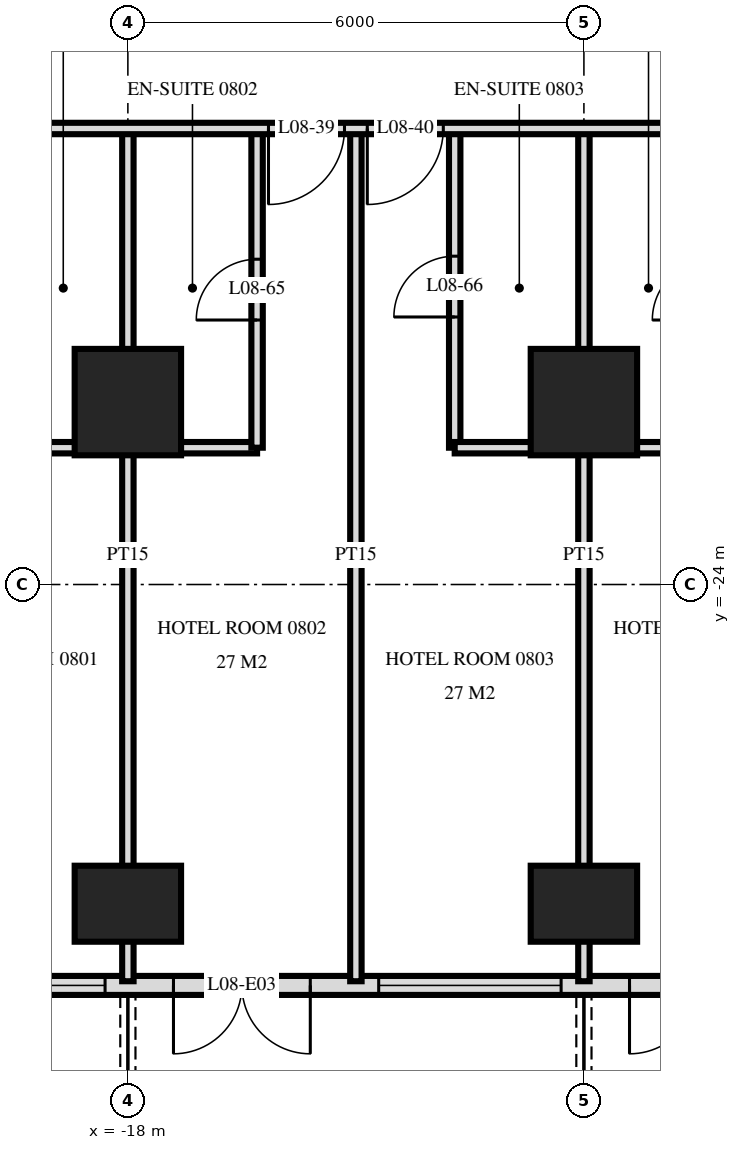
"""IFC4 building model, lengths in metres.
Left out: names, types, materials, properties, quantities, classifications, styles, units other than length and angle.
Written with IfcOpenShell. Run it as: python <this file> out.ifc"""

import sys

from ifc_helpers import new_model, si_unit, direction, frame, frame_2d, origin, origin_2d, place, context, subcontext, project, spatial, rectangle, extrude, element, fill, save


model = new_model("IFC4")
c1 = context("Model", 3, precision=1e-05, world=origin(), true_north=direction((0.0, 1.0)))
c2 = subcontext(c1, "Body", "Model", "MODEL_VIEW")
j1 = project(units=[si_unit("LENGTHUNIT", "METRE"), si_unit("PLANEANGLEUNIT", "RADIAN")], contexts=[c1])
p1 = place(None, origin())
s1 = spatial("IfcSite", under=j1, at=p1, CompositionType="ELEMENT")
p2 = place(p1, origin())
s2 = spatial("IfcBuilding", under=s1, at=p2, CompositionType="ELEMENT")
p3 = place(p2, frame((0.0, 0.0, 38.4)))
s3 = spatial("IfcBuildingStorey", under=s2, at=p3, CompositionType="ELEMENT", Elevation=38.4)
p4 = place(p3, frame((-18.0, -28.2, 0.0), z_axis=(0.0, 0.0, 1.0), x_axis=(1.0, 0.0, 0.0)))
e1 = element("IfcColumn", 1, at=p4, inside=s3, PredefinedType="COLUMN", context=c2, shape_type="SweptSolid", body=[
    extrude(rectangle(XDim=1.4, YDim=1.0, at=origin_2d()), origin(), (0.0, 0.0, 1.0), 3.6),
])
p5 = place(p3, frame((-18.0, -21.6, 0.0), z_axis=(0.0, 0.0, 1.0), x_axis=(1.0, 0.0, 0.0)))
e2 = element("IfcColumn", 2, at=p5, inside=s3, PredefinedType="COLUMN", context=c2, shape_type="SweptSolid", body=[
    extrude(rectangle(XDim=1.4, YDim=1.4, at=origin_2d()), origin(), (0.0, 0.0, 1.0), 3.6),
])
p6 = place(p3, frame((-12.0, -28.2, 0.0), z_axis=(0.0, 0.0, 1.0), x_axis=(1.0, 0.0, 0.0)))
e3 = element("IfcColumn", 3, at=p6, inside=s3, PredefinedType="COLUMN", context=c2, shape_type="SweptSolid", body=[
    extrude(rectangle(XDim=1.4, YDim=1.0, at=origin_2d()), origin(), (0.0, 0.0, 1.0), 3.6),
])
p7 = place(p3, frame((-12.0, -21.6, 0.0), z_axis=(0.0, 0.0, 1.0), x_axis=(1.0, 0.0, 0.0)))
e4 = element("IfcColumn", 4, at=p7, inside=s3, PredefinedType="COLUMN", context=c2, shape_type="SweptSolid", body=[
    extrude(rectangle(XDim=1.4, YDim=1.4, at=origin_2d()), origin(), (0.0, 0.0, 1.0), 3.6),
])
p8 = place(p3, frame((-28.775, -29.275, 0.0), z_axis=(0.0, 0.0, 1.0), x_axis=(1.0, 0.0, 0.0)))
e5 = element("IfcWall", 5, at=p8, inside=s3, PredefinedType="SOLIDWALL", context=c2, shape_type="SweptSolid", body=[
    extrude(rectangle(XDim=57.551, YDim=0.25, at=frame_2d((28.775, 0.0))), origin(), (0.0, 0.0, 1.0), 3.32),
])
p9 = place(p8, frame((0.575, 0.0, 0.0)))
e6 = element("IfcOpeningElement", 6, at=p9, cuts=e5, PredefinedType="OPENING", context=c2, shape_type="SweptSolid", body=[
    extrude(rectangle(XDim=1.8, YDim=2.4, at=frame_2d((0.9, 1.2))), frame((0.0, 0.135, 0.0), z_axis=(0.0, -1.0, 0.0), x_axis=(1.0, 0.0, 0.0)), (0.0, 0.0, 1.0), 0.27),
])
p10 = place(p8, frame((5.375, 0.0, 0.0)))
e7 = element("IfcOpeningElement", 7, at=p10, cuts=e5, PredefinedType="OPENING", context=c2, shape_type="SweptSolid", body=[
    extrude(rectangle(XDim=1.8, YDim=2.4, at=frame_2d((0.9, 1.2))), frame((0.0, 0.135, 0.0), z_axis=(0.0, -1.0, 0.0), x_axis=(1.0, 0.0, 0.0)), (0.0, 0.0, 1.0), 0.27),
])
p11 = place(p8, frame((8.075, 0.0, 0.3)))
e8 = element("IfcOpeningElement", 8, at=p11, cuts=e5, PredefinedType="OPENING", context=c2, shape_type="SweptSolid", body=[
    extrude(rectangle(XDim=2.4, YDim=2.1, at=frame_2d((1.2, 1.05))), frame((0.0, 0.135, 0.0), z_axis=(0.0, -1.0, 0.0), x_axis=(1.0, 0.0, 0.0)), (0.0, 0.0, 1.0), 0.27),
])
p12 = place(p8, frame((11.375, 0.0, 0.0)))
e9 = element("IfcOpeningElement", 9, at=p12, cuts=e5, PredefinedType="OPENING", context=c2, shape_type="SweptSolid", body=[
    extrude(rectangle(XDim=1.8, YDim=2.4, at=frame_2d((0.9, 1.2))), frame((0.0, 0.135, 0.0), z_axis=(0.0, -1.0, 0.0), x_axis=(1.0, 0.0, 0.0)), (0.0, 0.0, 1.0), 0.27),
])
p13 = place(p8, frame((14.075, 0.0, 0.3)))
e10 = element("IfcOpeningElement", 10, at=p13, cuts=e5, PredefinedType="OPENING", context=c2, shape_type="SweptSolid", body=[
    extrude(rectangle(XDim=2.4, YDim=2.1, at=frame_2d((1.2, 1.05))), frame((0.0, 0.135, 0.0), z_axis=(0.0, -1.0, 0.0), x_axis=(1.0, 0.0, 0.0)), (0.0, 0.0, 1.0), 0.27),
])
p14 = place(p8, frame((17.375, 0.0, 0.0)))
e11 = element("IfcOpeningElement", 11, at=p14, cuts=e5, PredefinedType="OPENING", context=c2, shape_type="SweptSolid", body=[
    extrude(rectangle(XDim=1.8, YDim=2.4, at=frame_2d((0.9, 1.2))), frame((0.0, 0.135, 0.0), z_axis=(0.0, -1.0, 0.0), x_axis=(1.0, 0.0, 0.0)), (0.0, 0.0, 1.0), 0.27),
])
p15 = place(p8, frame((20.075, 0.0, 0.3)))
e12 = element("IfcOpeningElement", 12, at=p15, cuts=e5, PredefinedType="OPENING", context=c2, shape_type="SweptSolid", body=[
    extrude(rectangle(XDim=2.4, YDim=2.1, at=frame_2d((1.2, 1.05))), frame((0.0, 0.135, 0.0), z_axis=(0.0, -1.0, 0.0), x_axis=(1.0, 0.0, 0.0)), (0.0, 0.0, 1.0), 0.27),
])
p16 = place(p8, frame((23.075, 0.0, 0.3)))
e13 = element("IfcOpeningElement", 13, at=p16, cuts=e5, PredefinedType="OPENING", context=c2, shape_type="SweptSolid", body=[
    extrude(rectangle(XDim=2.4, YDim=2.1, at=frame_2d((1.2, 1.05))), frame((0.0, 0.135, 0.0), z_axis=(0.0, -1.0, 0.0), x_axis=(1.0, 0.0, 0.0)), (0.0, 0.0, 1.0), 0.27),
])
p17 = place(p8, frame((26.375, 0.0, 0.0)))
e14 = element("IfcOpeningElement", 14, at=p17, cuts=e5, PredefinedType="OPENING", context=c2, shape_type="SweptSolid", body=[
    extrude(rectangle(XDim=1.8, YDim=2.4, at=frame_2d((0.9, 1.2))), frame((0.0, 0.135, 0.0), z_axis=(0.0, -1.0, 0.0), x_axis=(1.0, 0.0, 0.0)), (0.0, 0.0, 1.0), 0.27),
])
p18 = place(p8, frame((29.375, 0.0, 0.0)))
e15 = element("IfcOpeningElement", 15, at=p18, cuts=e5, PredefinedType="OPENING", context=c2, shape_type="SweptSolid", body=[
    extrude(rectangle(XDim=1.8, YDim=2.4, at=frame_2d((0.9, 1.2))), frame((0.0, 0.135, 0.0), z_axis=(0.0, -1.0, 0.0), x_axis=(1.0, 0.0, 0.0)), (0.0, 0.0, 1.0), 0.27),
])
p19 = place(p8, frame((32.075, 0.0, 0.3)))
e16 = element("IfcOpeningElement", 16, at=p19, cuts=e5, PredefinedType="OPENING", context=c2, shape_type="SweptSolid", body=[
    extrude(rectangle(XDim=2.4, YDim=2.1, at=frame_2d((1.2, 1.05))), frame((0.0, 0.135, 0.0), z_axis=(0.0, -1.0, 0.0), x_axis=(1.0, 0.0, 0.0)), (0.0, 0.0, 1.0), 0.27),
])
p20 = place(p8, frame((35.375, 0.0, 0.0)))
e17 = element("IfcOpeningElement", 17, at=p20, cuts=e5, PredefinedType="OPENING", context=c2, shape_type="SweptSolid", body=[
    extrude(rectangle(XDim=1.8, YDim=2.4, at=frame_2d((0.9, 1.2))), frame((0.0, 0.135, 0.0), z_axis=(0.0, -1.0, 0.0), x_axis=(1.0, 0.0, 0.0)), (0.0, 0.0, 1.0), 0.27),
])
p21 = place(p8, frame((38.075, 0.0, 0.3)))
e18 = element("IfcOpeningElement", 18, at=p21, cuts=e5, PredefinedType="OPENING", context=c2, shape_type="SweptSolid", body=[
    extrude(rectangle(XDim=2.4, YDim=2.1, at=frame_2d((1.2, 1.05))), frame((0.0, 0.135, 0.0), z_axis=(0.0, -1.0, 0.0), x_axis=(1.0, 0.0, 0.0)), (0.0, 0.0, 1.0), 0.27),
])
p22 = place(p8, frame((41.375, 0.0, 0.0)))
e19 = element("IfcOpeningElement", 19, at=p22, cuts=e5, PredefinedType="OPENING", context=c2, shape_type="SweptSolid", body=[
    extrude(rectangle(XDim=1.8, YDim=2.4, at=frame_2d((0.9, 1.2))), frame((0.0, 0.135, 0.0), z_axis=(0.0, -1.0, 0.0), x_axis=(1.0, 0.0, 0.0)), (0.0, 0.0, 1.0), 0.27),
])
p23 = place(p8, frame((44.075, 0.0, 0.3)))
e20 = element("IfcOpeningElement", 20, at=p23, cuts=e5, PredefinedType="OPENING", context=c2, shape_type="SweptSolid", body=[
    extrude(rectangle(XDim=2.4, YDim=2.1, at=frame_2d((1.2, 1.05))), frame((0.0, 0.135, 0.0), z_axis=(0.0, -1.0, 0.0), x_axis=(1.0, 0.0, 0.0)), (0.0, 0.0, 1.0), 0.27),
])
p24 = place(p8, frame((47.375, 0.0, 0.0)))
e21 = element("IfcOpeningElement", 21, at=p24, cuts=e5, PredefinedType="OPENING", context=c2, shape_type="SweptSolid", body=[
    extrude(rectangle(XDim=1.8, YDim=2.4, at=frame_2d((0.9, 1.2))), frame((0.0, 0.135, 0.0), z_axis=(0.0, -1.0, 0.0), x_axis=(1.0, 0.0, 0.0)), (0.0, 0.0, 1.0), 0.27),
])
p25 = place(p8, frame((50.075, 0.0, 0.3)))
e22 = element("IfcOpeningElement", 22, at=p25, cuts=e5, PredefinedType="OPENING", context=c2, shape_type="SweptSolid", body=[
    extrude(rectangle(XDim=2.4, YDim=2.1, at=frame_2d((1.2, 1.05))), frame((0.0, 0.135, 0.0), z_axis=(0.0, -1.0, 0.0), x_axis=(1.0, 0.0, 0.0)), (0.0, 0.0, 1.0), 0.27),
])
p26 = place(p8, frame((53.375, 0.0, 0.0)))
e23 = element("IfcOpeningElement", 23, at=p26, cuts=e5, PredefinedType="OPENING", context=c2, shape_type="SweptSolid", body=[
    extrude(rectangle(XDim=1.8, YDim=2.4, at=frame_2d((0.9, 1.2))), frame((0.0, 0.135, 0.0), z_axis=(0.0, -1.0, 0.0), x_axis=(1.0, 0.0, 0.0)), (0.0, 0.0, 1.0), 0.27),
])
p27 = place(p3, frame((-12.0, -29.22, 0.0), z_axis=(0.0, 0.0, 1.0), x_axis=(0.0, 1.0, 0.0)))
e24 = element("IfcWall", 24, at=p27, inside=s3, PredefinedType="PARTITIONING", context=c2, shape_type="SweptSolid", body=[
    extrude(rectangle(XDim=11.22, YDim=0.15, at=frame_2d((5.61, 0.0))), origin(), (0.0, 0.0, 1.0), 3.32),
])
p28 = place(p3, frame((-13.7, -22.2, 0.0), z_axis=(0.0, 0.0, 1.0), x_axis=(0.0, 1.0, 0.0)))
e25 = element("IfcWall", 25, at=p28, inside=s3, PredefinedType="PARTITIONING", context=c2, shape_type="SweptSolid", body=[
    extrude(rectangle(XDim=4.2, YDim=0.15, at=frame_2d((2.1, 0.0))), origin(), (0.0, 0.0, 1.0), 3.32),
])
p29 = place(p28, frame((1.72, 0.0, 0.0)))
e26 = element("IfcOpeningElement", 26, at=p29, cuts=e25, PredefinedType="OPENING", context=c2, shape_type="SweptSolid", body=[
    extrude(rectangle(XDim=0.8, YDim=2.1, at=frame_2d((0.4, 1.05))), frame((0.0, 0.085, 0.0), z_axis=(0.0, -1.0, 0.0), x_axis=(1.0, 0.0, 0.0)), (0.0, 0.0, 1.0), 0.17),
])
p30 = place(p3, frame((-15.0, -29.22, 0.0), z_axis=(0.0, 0.0, 1.0), x_axis=(0.0, 1.0, 0.0)))
e27 = element("IfcWall", 27, at=p30, inside=s3, PredefinedType="PARTITIONING", context=c2, shape_type="SweptSolid", body=[
    extrude(rectangle(XDim=11.22, YDim=0.15, at=frame_2d((5.61, 0.0))), origin(), (0.0, 0.0, 1.0), 3.32),
])
p31 = place(p3, frame((-16.3, -22.2, 0.0), z_axis=(0.0, 0.0, 1.0), x_axis=(0.0, 1.0, 0.0)))
e28 = element("IfcWall", 28, at=p31, inside=s3, PredefinedType="PARTITIONING", context=c2, shape_type="SweptSolid", body=[
    extrude(rectangle(XDim=4.2, YDim=0.15, at=frame_2d((2.1, 0.0))), origin(), (0.0, 0.0, 1.0), 3.32),
])
p32 = place(p31, frame((1.68, 0.0, 0.0)))
e29 = element("IfcOpeningElement", 29, at=p32, cuts=e28, PredefinedType="OPENING", context=c2, shape_type="SweptSolid", body=[
    extrude(rectangle(XDim=0.8, YDim=2.1, at=frame_2d((0.4, 1.05))), frame((0.0, 0.085, 0.0), z_axis=(0.0, -1.0, 0.0), x_axis=(1.0, 0.0, 0.0)), (0.0, 0.0, 1.0), 0.17),
])
p33 = place(p3, frame((-18.0, -29.22, 0.0), z_axis=(0.0, 0.0, 1.0), x_axis=(0.0, 1.0, 0.0)))
e30 = element("IfcWall", 30, at=p33, inside=s3, PredefinedType="PARTITIONING", context=c2, shape_type="SweptSolid", body=[
    extrude(rectangle(XDim=11.22, YDim=0.15, at=frame_2d((5.61, 0.0))), origin(), (0.0, 0.0, 1.0), 3.32),
])
for number, where, z_axis, x_axis in (
    (31, (-19.7, -22.2, 0.0), (0.0, 0.0, 1.0), (1.0, 0.0, 0.0)),
    (32, (-13.7, -22.2, 0.0), (0.0, 0.0, 1.0), (1.0, 0.0, 0.0)),
):
    element("IfcWall", number, at=place(p3, frame(where, z_axis=z_axis, x_axis=x_axis)), inside=s3, PredefinedType="PARTITIONING", context=c2, shape_type="SweptSolid", body=[
        extrude(rectangle(XDim=3.4, YDim=0.15, at=frame_2d((1.7, 0.0))), origin(), (0.0, 0.0, 1.0), 3.32),
    ])
p34 = place(p3, frame((-33.12, -18.0, 0.0), z_axis=(0.0, 0.0, 1.0), x_axis=(1.0, 0.0, 0.0)))
e33 = element("IfcWall", 33, at=p34, inside=s3, PredefinedType="PARTITIONING", context=c2, shape_type="SweptSolid", body=[
    extrude(rectangle(XDim=66.24, YDim=0.15, at=frame_2d((33.12, 0.0))), origin(), (0.0, 0.0, 1.0), 3.32),
])
p35 = place(p34, frame((12.27, 0.0, 0.0)))
e34 = element("IfcOpeningElement", 34, at=p35, cuts=e33, PredefinedType="OPENING", context=c2, shape_type="SweptSolid", body=[
    extrude(rectangle(XDim=1.0, YDim=2.1, at=frame_2d((0.5, 1.05))), frame((0.0, 0.085, 0.0), z_axis=(0.0, -1.0, 0.0), x_axis=(1.0, 0.0, 0.0)), (0.0, 0.0, 1.0), 0.17),
])
p36 = place(p34, frame((16.97, 0.0, 0.0)))
e35 = element("IfcOpeningElement", 35, at=p36, cuts=e33, PredefinedType="OPENING", context=c2, shape_type="SweptSolid", body=[
    extrude(rectangle(XDim=1.0, YDim=2.1, at=frame_2d((0.5, 1.05))), frame((0.0, 0.085, 0.0), z_axis=(0.0, -1.0, 0.0), x_axis=(1.0, 0.0, 0.0)), (0.0, 0.0, 1.0), 0.17),
])
p37 = place(p34, frame((18.27, 0.0, 0.0)))
e36 = element("IfcOpeningElement", 36, at=p37, cuts=e33, PredefinedType="OPENING", context=c2, shape_type="SweptSolid", body=[
    extrude(rectangle(XDim=1.0, YDim=2.1, at=frame_2d((0.5, 1.05))), frame((0.0, 0.085, 0.0), z_axis=(0.0, -1.0, 0.0), x_axis=(1.0, 0.0, 0.0)), (0.0, 0.0, 1.0), 0.17),
])
p38 = place(p34, frame((22.97, 0.0, 0.0)))
e37 = element("IfcOpeningElement", 37, at=p38, cuts=e33, PredefinedType="OPENING", context=c2, shape_type="SweptSolid", body=[
    extrude(rectangle(XDim=1.0, YDim=2.1, at=frame_2d((0.5, 1.05))), frame((0.0, 0.085, 0.0), z_axis=(0.0, -1.0, 0.0), x_axis=(1.0, 0.0, 0.0)), (0.0, 0.0, 1.0), 0.17),
])
p39 = place(p34, frame((24.27, 0.0, 0.0)))
e38 = element("IfcOpeningElement", 38, at=p39, cuts=e33, PredefinedType="OPENING", context=c2, shape_type="SweptSolid", body=[
    extrude(rectangle(XDim=1.0, YDim=2.1, at=frame_2d((0.5, 1.05))), frame((0.0, 0.085, 0.0), z_axis=(0.0, -1.0, 0.0), x_axis=(1.0, 0.0, 0.0)), (0.0, 0.0, 1.0), 0.17),
])
p40 = place(p34, frame((28.97, 0.0, 0.0)))
e39 = element("IfcOpeningElement", 39, at=p40, cuts=e33, PredefinedType="OPENING", context=c2, shape_type="SweptSolid", body=[
    extrude(rectangle(XDim=1.0, YDim=2.1, at=frame_2d((0.5, 1.05))), frame((0.0, 0.085, 0.0), z_axis=(0.0, -1.0, 0.0), x_axis=(1.0, 0.0, 0.0)), (0.0, 0.0, 1.0), 0.17),
])
p41 = place(p34, frame((30.27, 0.0, 0.0)))
e40 = element("IfcOpeningElement", 40, at=p41, cuts=e33, PredefinedType="OPENING", context=c2, shape_type="SweptSolid", body=[
    extrude(rectangle(XDim=1.0, YDim=2.1, at=frame_2d((0.5, 1.05))), frame((0.0, 0.085, 0.0), z_axis=(0.0, -1.0, 0.0), x_axis=(1.0, 0.0, 0.0)), (0.0, 0.0, 1.0), 0.17),
])
p42 = place(p34, frame((34.97, 0.0, 0.0)))
e41 = element("IfcOpeningElement", 41, at=p42, cuts=e33, PredefinedType="OPENING", context=c2, shape_type="SweptSolid", body=[
    extrude(rectangle(XDim=1.0, YDim=2.1, at=frame_2d((0.5, 1.05))), frame((0.0, 0.085, 0.0), z_axis=(0.0, -1.0, 0.0), x_axis=(1.0, 0.0, 0.0)), (0.0, 0.0, 1.0), 0.17),
])
p43 = place(p34, frame((37.27, 0.0, 0.0)))
e42 = element("IfcOpeningElement", 42, at=p43, cuts=e33, PredefinedType="OPENING", context=c2, shape_type="SweptSolid", body=[
    extrude(rectangle(XDim=1.0, YDim=2.1, at=frame_2d((0.5, 1.05))), frame((0.0, 0.085, 0.0), z_axis=(0.0, -1.0, 0.0), x_axis=(1.0, 0.0, 0.0)), (0.0, 0.0, 1.0), 0.17),
])
p44 = place(p34, frame((43.97, 0.0, 0.0)))
e43 = element("IfcOpeningElement", 43, at=p44, cuts=e33, PredefinedType="OPENING", context=c2, shape_type="SweptSolid", body=[
    extrude(rectangle(XDim=1.0, YDim=2.1, at=frame_2d((0.5, 1.05))), frame((0.0, 0.085, 0.0), z_axis=(0.0, -1.0, 0.0), x_axis=(1.0, 0.0, 0.0)), (0.0, 0.0, 1.0), 0.17),
])
p45 = place(p34, frame((45.27, 0.0, 0.0)))
e44 = element("IfcOpeningElement", 44, at=p45, cuts=e33, PredefinedType="OPENING", context=c2, shape_type="SweptSolid", body=[
    extrude(rectangle(XDim=1.0, YDim=2.1, at=frame_2d((0.5, 1.05))), frame((0.0, 0.085, 0.0), z_axis=(0.0, -1.0, 0.0), x_axis=(1.0, 0.0, 0.0)), (0.0, 0.0, 1.0), 0.17),
])
p46 = place(p34, frame((51.22, 0.0, 0.0)))
e45 = element("IfcOpeningElement", 45, at=p46, cuts=e33, PredefinedType="OPENING", context=c2, shape_type="SweptSolid", body=[
    extrude(rectangle(XDim=1.0, YDim=2.1, at=frame_2d((0.5, 1.05))), frame((0.0, 0.085, 0.0), z_axis=(0.0, -1.0, 0.0), x_axis=(1.0, 0.0, 0.0)), (0.0, 0.0, 1.0), 0.17),
])
p47 = place(p34, frame((54.27, 0.0, 0.0)))
e46 = element("IfcOpeningElement", 46, at=p47, cuts=e33, PredefinedType="OPENING", context=c2, shape_type="SweptSolid", body=[
    extrude(rectangle(XDim=1.0, YDim=2.1, at=frame_2d((0.5, 1.05))), frame((0.0, 0.085, 0.0), z_axis=(0.0, -1.0, 0.0), x_axis=(1.0, 0.0, 0.0)), (0.0, 0.0, 1.0), 0.17),
])
p48 = place(p34, frame((6.07, 0.0, 0.0)))
e47 = element("IfcOpeningElement", 47, at=p48, cuts=e33, PredefinedType="OPENING", context=c2, shape_type="SweptSolid", body=[
    extrude(rectangle(XDim=1.0, YDim=2.1, at=frame_2d((0.5, 1.05))), frame((0.0, 0.085, 0.0), z_axis=(0.0, -1.0, 0.0), x_axis=(1.0, 0.0, 0.0)), (0.0, 0.0, 1.0), 0.17),
])
p49 = place(p34, frame((63.37, 0.0, 0.0)))
e48 = element("IfcOpeningElement", 48, at=p49, cuts=e33, PredefinedType="OPENING", context=c2, shape_type="SweptSolid", body=[
    extrude(rectangle(XDim=1.0, YDim=2.1, at=frame_2d((0.5, 1.05))), frame((0.0, 0.085, 0.0), z_axis=(0.0, -1.0, 0.0), x_axis=(1.0, 0.0, 0.0)), (0.0, 0.0, 1.0), 0.17),
])
p50 = place(p11, origin())
e49 = element("IfcWindow", 49, at=p50, inside=s3, PartitioningType="SINGLE_PANEL", PredefinedType="WINDOW", context=c2, shape_type="SweptSolid", body=[
    extrude(rectangle(XDim=2.4, YDim=2.1, at=frame_2d((1.2, 1.05))), frame((0.0, 0.03, 0.0), z_axis=(0.0, -1.0, 0.0), x_axis=(1.0, 0.0, 0.0)), (0.0, 0.0, 1.0), 0.06),
])
fill(e8, e49)
p51 = place(p12, frame((0.9, 0.0, 0.0), z_axis=(0.0, 0.0, 1.0), x_axis=(-1.0, 0.0, 0.0)))
e50 = element("IfcDoor", 50, at=p51, inside=s3, OperationType="DOUBLE_DOOR_SINGLE_SWING", PredefinedType="DOOR", context=c2, shape_type="SweptSolid", body=[
    extrude(rectangle(XDim=1.8, YDim=2.4, at=frame_2d((0.0, 1.2))), frame((0.0, -0.025, 0.0), z_axis=(0.0, 1.0, 0.0), x_axis=(-1.0, 0.0, 0.0)), (0.0, 0.0, 1.0), 0.05),
])
fill(e9, e50)
p52 = place(p13, origin())
e51 = element("IfcWindow", 51, at=p52, inside=s3, PartitioningType="SINGLE_PANEL", PredefinedType="WINDOW", context=c2, shape_type="SweptSolid", body=[
    extrude(rectangle(XDim=2.4, YDim=2.1, at=frame_2d((1.2, 1.05))), frame((0.0, 0.03, 0.0), z_axis=(0.0, -1.0, 0.0), x_axis=(1.0, 0.0, 0.0)), (0.0, 0.0, 1.0), 0.06),
])
fill(e10, e51)
p53 = place(p14, frame((0.9, 0.0, 0.0), z_axis=(0.0, 0.0, 1.0), x_axis=(-1.0, 0.0, 0.0)))
e52 = element("IfcDoor", 52, at=p53, inside=s3, OperationType="DOUBLE_DOOR_SINGLE_SWING", PredefinedType="DOOR", context=c2, shape_type="SweptSolid", body=[
    extrude(rectangle(XDim=1.8, YDim=2.4, at=frame_2d((0.0, 1.2))), frame((0.0, -0.025, 0.0), z_axis=(0.0, 1.0, 0.0), x_axis=(-1.0, 0.0, 0.0)), (0.0, 0.0, 1.0), 0.05),
])
fill(e11, e52)
p54 = place(p36, frame((0.5, 0.0, 0.0), z_axis=(0.0, 0.0, 1.0), x_axis=(-1.0, 0.0, 0.0)))
e53 = element("IfcDoor", 53, at=p54, inside=s3, OperationType="SINGLE_SWING_LEFT", PredefinedType="DOOR", context=c2, shape_type="SweptSolid", body=[
    extrude(rectangle(XDim=1.0, YDim=2.1, at=frame_2d((0.0, 1.05))), frame((0.0, -0.025, 0.0), z_axis=(0.0, 1.0, 0.0), x_axis=(-1.0, 0.0, 0.0)), (0.0, 0.0, 1.0), 0.05),
])
fill(e35, e53)
p55 = place(p37, frame((0.5, 0.0, 0.0), z_axis=(0.0, 0.0, 1.0), x_axis=(-1.0, 0.0, 0.0)))
e54 = element("IfcDoor", 54, at=p55, inside=s3, OperationType="SINGLE_SWING_LEFT", PredefinedType="DOOR", context=c2, shape_type="SweptSolid", body=[
    extrude(rectangle(XDim=1.0, YDim=2.1, at=frame_2d((0.0, 1.05))), frame((0.0, -0.025, 0.0), z_axis=(0.0, 1.0, 0.0), x_axis=(-1.0, 0.0, 0.0)), (0.0, 0.0, 1.0), 0.05),
])
fill(e36, e54)
p56 = place(p32, origin())
e55 = element("IfcDoor", 55, at=p56, inside=s3, OperationType="SINGLE_SWING_RIGHT", PredefinedType="DOOR", context=c2, shape_type="SweptSolid", body=[
    extrude(rectangle(XDim=0.8, YDim=2.1, at=frame_2d((0.4, 1.05))), frame((0.0, 0.025, 0.0), z_axis=(0.0, -1.0, 0.0), x_axis=(1.0, 0.0, 0.0)), (0.0, 0.0, 1.0), 0.05),
])
fill(e29, e55)
p57 = place(p29, origin())
e56 = element("IfcDoor", 56, at=p57, inside=s3, OperationType="SINGLE_SWING_RIGHT", PredefinedType="DOOR", context=c2, shape_type="SweptSolid", body=[
    extrude(rectangle(XDim=0.8, YDim=2.1, at=frame_2d((0.4, 1.05))), frame((0.0, 0.025, 0.0), z_axis=(0.0, -1.0, 0.0), x_axis=(1.0, 0.0, 0.0)), (0.0, 0.0, 1.0), 0.05),
])
fill(e26, e56)
save(model, sys.argv[1])
